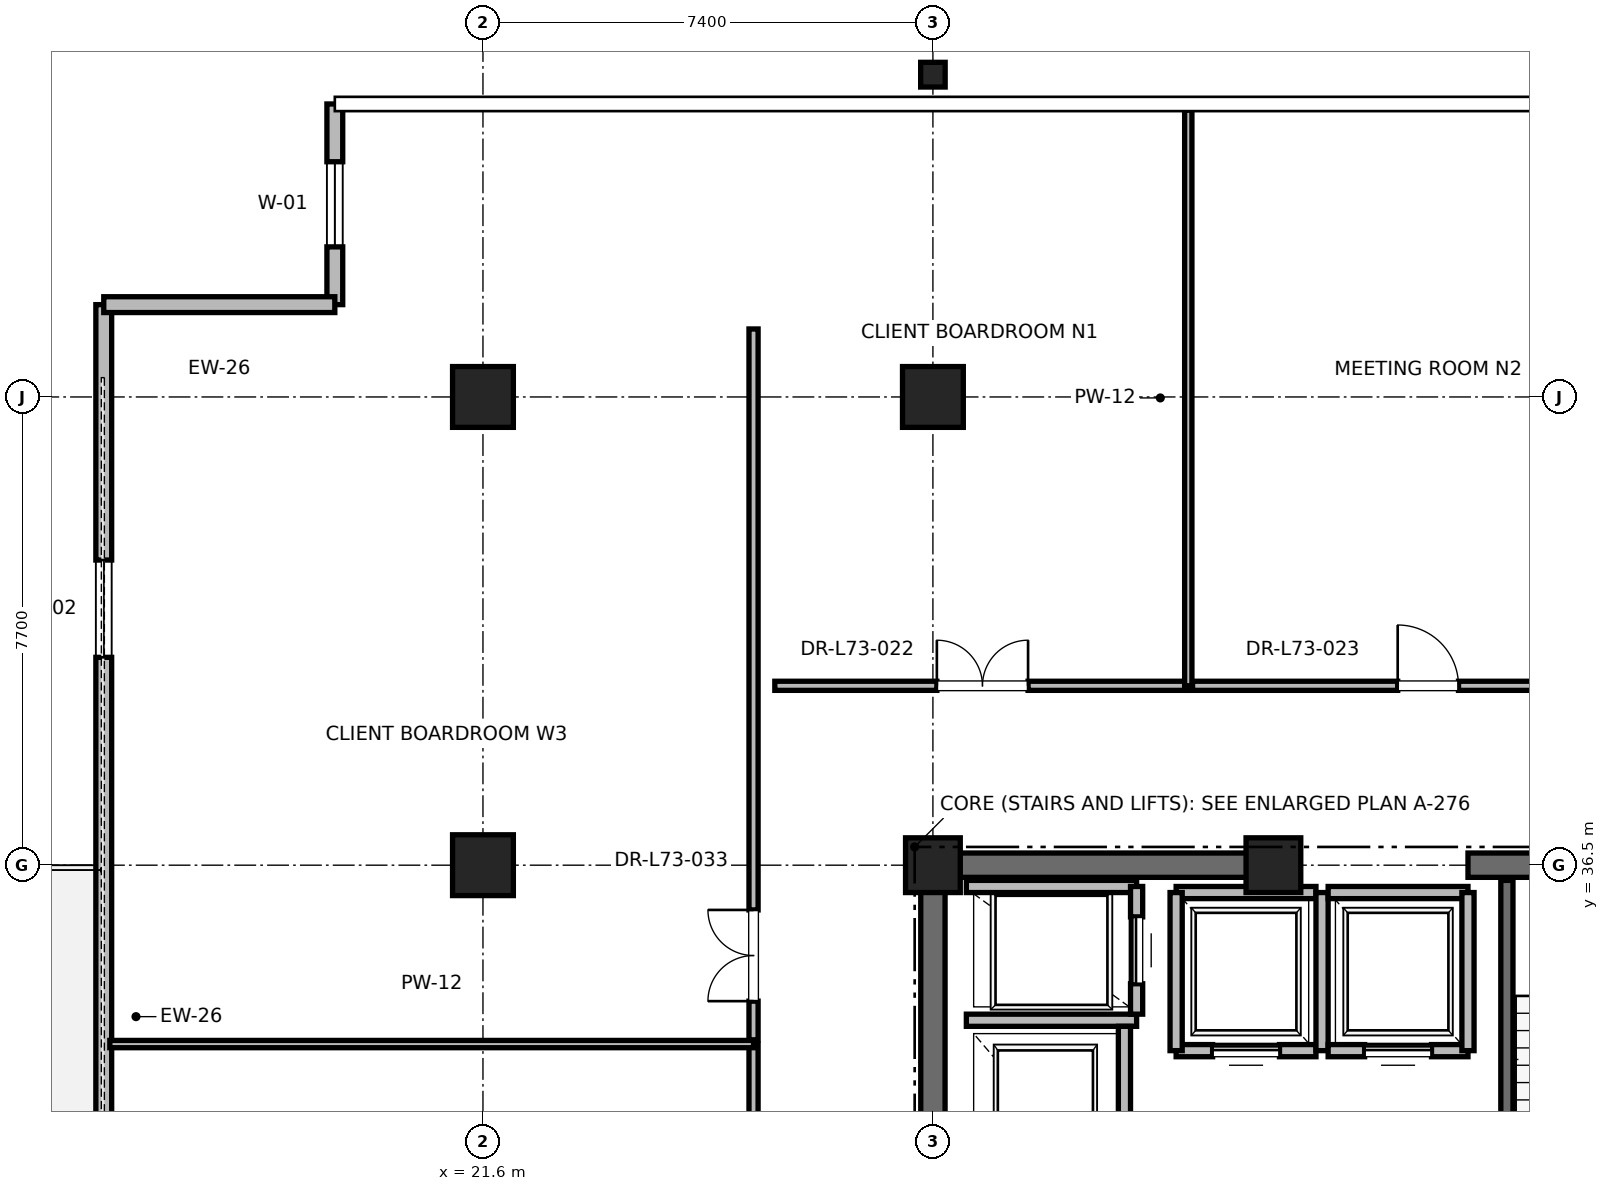
"""IFC4 building model, lengths in metres.
Left out: names, types, materials, properties, quantities, classifications, styles, units other than length and angle.
Written with IfcOpenShell. Run it as: python <this file> out.ifc"""

import sys

from ifc_helpers import new_model, si_unit, direction, frame, frame_2d, origin, origin_2d, place, context, subcontext, project, spatial, rectangle, i_section, extrude, element, fill, save


model = new_model("IFC4")
c1 = context("Model", 3, precision=1e-05, world=origin(), true_north=direction((0.0, 1.0)))
c2 = subcontext(c1, "Body", "Model", "MODEL_VIEW")
j1 = project(units=[si_unit("LENGTHUNIT", "METRE"), si_unit("PLANEANGLEUNIT", "RADIAN")], contexts=[c1])
p1 = place(None, origin())
s1 = spatial("IfcSite", under=j1, at=p1, CompositionType="ELEMENT")
p2 = place(p1, origin())
s2 = spatial("IfcBuilding", under=s1, at=p2, CompositionType="ELEMENT")
p3 = place(p2, frame((0.0, 0.0, 314.8)))
s3 = spatial("IfcBuildingStorey", under=s2, at=p3, CompositionType="ELEMENT", Elevation=314.8)
for number, where, z_axis, x_axis in (
    (1, (29.0, 44.2, 0.0), (0.0, 0.0, 1.0), (1.0, 0.0, 0.0)),
    (2, (21.6, 36.5, 0.0), (0.0, 0.0, 1.0), (1.0, 0.0, 0.0)),
    (3, (21.6, 44.2, 0.0), (0.0, 0.0, 1.0), (1.0, 0.0, 0.0)),
):
    element("IfcColumn", number, at=place(p3, frame(where, z_axis=z_axis, x_axis=x_axis)), inside=s3, PredefinedType="COLUMN", context=c2, shape_type="SweptSolid", body=[
        extrude(rectangle(XDim=1.0, YDim=1.0, at=origin_2d()), origin(), (0.0, 0.0, 1.0), 4.0),
    ])
p4 = place(p3, frame((29.0, 49.5, 0.0), z_axis=(0.0, 0.0, 1.0), x_axis=(1.0, 0.0, 0.0)))
e4 = element("IfcColumn", 4, at=p4, inside=s3, PredefinedType="COLUMN", context=c2, shape_type="SweptSolid", body=[
    extrude(i_section(OverallWidth=0.403, OverallDepth=0.406, WebThickness=0.027, FlangeThickness=0.043, FilletRadius=0.015, at=origin_2d()), origin(), (0.0, 0.0, 1.0), 4.0),
])
for number, where, z_axis, x_axis in (
    (5, (29.0, 36.5, 0.0), (0.0, 0.0, 1.0), (1.0, 0.0, 0.0)),
    (6, (34.6, 36.5, 0.0), (0.0, 0.0, 1.0), (1.0, 0.0, 0.0)),
):
    element("IfcColumn", number, at=place(p3, frame(where, z_axis=z_axis, x_axis=x_axis)), inside=s3, PredefinedType="PILASTER", context=c2, shape_type="SweptSolid", body=[
        extrude(rectangle(XDim=0.9, YDim=0.9, at=origin_2d()), origin(), (0.0, 0.0, 1.0), 4.0),
    ])
p5 = place(p3, frame((29.0, 36.5, 0.0), z_axis=(0.0, 0.0, 1.0), x_axis=(1.0, 0.0, 0.0)))
e7 = element("IfcWall", 7, at=p5, inside=s3, PredefinedType="SHEAR", context=c2, shape_type="SweptSolid", body=[
    extrude(rectangle(XDim=5.8, YDim=0.4, at=frame_2d((2.9, 0.0))), origin(), (0.0, 0.0, 1.0), 3.785),
])
p6 = place(p3, frame((37.8, 36.5, 0.0), z_axis=(0.0, 0.0, 1.0), x_axis=(1.0, 0.0, 0.0)))
e8 = element("IfcWall", 8, at=p6, inside=s3, PredefinedType="SHEAR", context=c2, shape_type="SweptSolid", body=[
    extrude(rectangle(XDim=4.4, YDim=0.4, at=frame_2d((2.2, 0.0))), origin(), (0.0, 0.0, 1.0), 3.785),
])
p7 = place(p6, frame((1.65, 0.0, 0.0)))
e9 = element("IfcOpeningElement", 9, at=p7, cuts=e8, PredefinedType="OPENING", context=c2, shape_type="SweptSolid", body=[
    extrude(rectangle(XDim=1.1, YDim=2.15, at=frame_2d((0.55, 1.075))), frame((0.0, 0.2, 0.0), z_axis=(0.0, -1.0, 0.0), x_axis=(1.0, 0.0, 0.0)), (0.0, 0.0, 1.0), 0.4),
])
p8 = place(p3, frame((29.0, 30.7, 0.0), z_axis=(0.0, 0.0, 1.0), x_axis=(0.0, 1.0, 0.0)))
e10 = element("IfcWall", 10, at=p8, inside=s3, PredefinedType="SHEAR", context=c2, shape_type="SweptSolid", body=[
    extrude(rectangle(XDim=5.8, YDim=0.4, at=frame_2d((2.9, 0.0))), origin(), (0.0, 0.0, 1.0), 3.785),
])
p9 = place(p3, frame((15.364, 45.718, 0.0), z_axis=(0.0, 0.0, 1.0), x_axis=(0.0, -1.0, 0.0)))
e11 = element("IfcWall", 11, at=p9, inside=s3, PredefinedType="PARAPET", context=c2, shape_type="SweptSolid", body=[
    extrude(rectangle(XDim=36.437, YDim=0.26, at=frame_2d((18.218, 0.0))), origin(), (0.0, 0.0, 1.0), 3.196),
])
p10 = place(p9, frame((4.2, 0.0, 0.85)))
e12 = element("IfcOpeningElement", 12, at=p10, cuts=e11, PredefinedType="OPENING", context=c2, shape_type="SweptSolid", body=[
    extrude(rectangle(XDim=1.6, YDim=2.1, at=frame_2d((0.8, 1.05))), frame((0.0, 0.13, 0.0), z_axis=(0.0, -1.0, 0.0), x_axis=(1.0, 0.0, 0.0)), (0.0, 0.0, 1.0), 0.26),
])
p11 = place(p9, frame((17.618, 0.0, 0.0)))
e13 = element("IfcOpeningElement", 13, at=p11, cuts=e11, PredefinedType="OPENING", context=c2, shape_type="SweptSolid", body=[
    extrude(rectangle(XDim=1.2, YDim=2.2, at=frame_2d((0.6, 1.1))), frame((0.0, 0.13, 0.0), z_axis=(0.0, -1.0, 0.0), x_axis=(1.0, 0.0, 0.0)), (0.0, 0.0, 1.0), 0.26),
])
p12 = place(p9, frame((30.636, 0.0, 0.85)))
e14 = element("IfcOpeningElement", 14, at=p12, cuts=e11, PredefinedType="OPENING", context=c2, shape_type="SweptSolid", body=[
    extrude(rectangle(XDim=1.6, YDim=2.1, at=frame_2d((0.8, 1.05))), frame((0.0, 0.13, 0.0), z_axis=(0.0, -1.0, 0.0), x_axis=(1.0, 0.0, 0.0)), (0.0, 0.0, 1.0), 0.26),
])
p13 = place(p3, frame((19.164, 49.018, 0.0), z_axis=(0.0, 0.0, 1.0), x_axis=(0.0, -1.0, 0.0)))
e15 = element("IfcWall", 15, at=p13, inside=s3, PredefinedType="PARAPET", context=c2, shape_type="SweptSolid", body=[
    extrude(rectangle(XDim=3.3, YDim=0.26, at=frame_2d((1.65, 0.0))), origin(), (0.0, 0.0, 1.0), 3.785),
])
p14 = place(p13, frame((0.95, 0.0, 0.85)))
e16 = element("IfcOpeningElement", 16, at=p14, cuts=e15, PredefinedType="OPENING", context=c2, shape_type="SweptSolid", body=[
    extrude(rectangle(XDim=1.4, YDim=2.0, at=frame_2d((0.7, 1.0))), frame((0.0, 0.13, 0.0), z_axis=(0.0, -1.0, 0.0), x_axis=(1.0, 0.0, 0.0)), (0.0, 0.0, 1.0), 0.26),
])
p15 = place(p3, frame((19.164, 45.718, 0.0), z_axis=(0.0, 0.0, 1.0), x_axis=(-1.0, 0.0, 0.0)))
e17 = element("IfcWall", 17, at=p15, inside=s3, PredefinedType="PARAPET", context=c2, shape_type="SweptSolid", body=[
    extrude(rectangle(XDim=3.8, YDim=0.26, at=frame_2d((1.9, 0.0))), origin(), (0.0, 0.0, 1.0), 3.785),
])
p16 = place(p3, frame((38.44, 27.38, 0.0), z_axis=(0.0, 0.0, 1.0), x_axis=(0.0, 1.0, 0.0)))
e18 = element("IfcWall", 18, at=p16, inside=s3, PredefinedType="SOLIDWALL", context=c2, shape_type="SweptSolid", body=[
    extrude(rectangle(XDim=8.87, YDim=0.2, at=frame_2d((4.435, 0.0))), origin(), (0.0, 0.0, 1.0), 3.785),
])
p17 = place(p3, frame((29.55, 33.95, 0.0), z_axis=(0.0, 0.0, 1.0), x_axis=(1.0, 0.0, 0.0)))
e19 = element("IfcWall", 19, at=p17, inside=s3, PredefinedType="SOLIDWALL", context=c2, shape_type="SweptSolid", body=[
    extrude(rectangle(XDim=2.8, YDim=0.2, at=frame_2d((1.4, 0.0))), origin(), (0.0, 0.0, 1.0), 3.785),
])
p18 = place(p3, frame((32.15, 30.85, 0.0), z_axis=(0.0, 0.0, 1.0), x_axis=(0.0, 1.0, 0.0)))
e20 = element("IfcWall", 20, at=p18, inside=s3, PredefinedType="SOLIDWALL", context=c2, shape_type="SweptSolid", body=[
    extrude(rectangle(XDim=3.0, YDim=0.2, at=frame_2d((1.5, 0.0))), origin(), (0.0, 0.0, 1.0), 3.785),
])
p19 = place(p3, frame((32.35, 36.15, 0.0), z_axis=(0.0, 0.0, 1.0), x_axis=(-1.0, 0.0, 0.0)))
e21 = element("IfcWall", 21, at=p19, inside=s3, PredefinedType="SOLIDWALL", context=c2, shape_type="SweptSolid", body=[
    extrude(rectangle(XDim=2.8, YDim=0.2, at=frame_2d((1.4, 0.0))), origin(), (0.0, 0.0, 1.0), 3.22),
])
p20 = place(p3, frame((32.35, 34.05, 0.0), z_axis=(0.0, 0.0, 1.0), x_axis=(0.0, 1.0, 0.0)))
e22 = element("IfcWall", 22, at=p20, inside=s3, PredefinedType="SOLIDWALL", context=c2, shape_type="SweptSolid", body=[
    extrude(rectangle(XDim=2.1, YDim=0.2, at=frame_2d((1.05, 0.0))), origin(), (0.0, 0.0, 1.0), 3.785),
])
p21 = place(p20, frame((0.5, 0.0, 0.0)))
e23 = element("IfcOpeningElement", 23, at=p21, cuts=e22, PredefinedType="OPENING", context=c2, shape_type="SweptSolid", body=[
    extrude(rectangle(XDim=1.1, YDim=2.2, at=frame_2d((0.55, 1.1))), frame((0.0, 0.1, 0.0), z_axis=(0.0, -1.0, 0.0), x_axis=(1.0, 0.0, 0.0)), (0.0, 0.0, 1.0), 0.2),
])
p22 = place(p3, frame((33.0, 33.45, 0.0), z_axis=(0.0, 0.0, 1.0), x_axis=(1.0, 0.0, 0.0)))
e24 = element("IfcWall", 24, at=p22, inside=s3, PredefinedType="SOLIDWALL", context=c2, shape_type="SweptSolid", body=[
    extrude(rectangle(XDim=2.3, YDim=0.2, at=frame_2d((1.15, 0.0))), origin(), (0.0, 0.0, 1.0), 3.785),
])
p23 = place(p22, frame((0.6, 0.0, 0.0)))
e25 = element("IfcOpeningElement", 25, at=p23, cuts=e24, PredefinedType="OPENING", context=c2, shape_type="SweptSolid", body=[
    extrude(rectangle(XDim=1.1, YDim=2.2, at=frame_2d((0.55, 1.1))), frame((0.0, 0.1, 0.0), z_axis=(0.0, -1.0, 0.0), x_axis=(1.0, 0.0, 0.0)), (0.0, 0.0, 1.0), 0.2),
])
p24 = place(p3, frame((35.3, 36.05, 0.0), z_axis=(0.0, 0.0, 1.0), x_axis=(-1.0, 0.0, 0.0)))
e26 = element("IfcWall", 26, at=p24, inside=s3, PredefinedType="SOLIDWALL", context=c2, shape_type="SweptSolid", body=[
    extrude(rectangle(XDim=2.3, YDim=0.2, at=frame_2d((1.15, 0.0))), origin(), (0.0, 0.0, 1.0), 2.865),
])
p25 = place(p3, frame((33.0, 36.05, 0.0), z_axis=(0.0, 0.0, 1.0), x_axis=(0.0, -1.0, 0.0)))
e27 = element("IfcWall", 27, at=p25, inside=s3, PredefinedType="SOLIDWALL", context=c2, shape_type="SweptSolid", body=[
    extrude(rectangle(XDim=2.6, YDim=0.2, at=frame_2d((1.3, 0.0))), origin(), (0.0, 0.0, 1.0), 3.785),
])
p26 = place(p3, frame((35.4, 33.45, 0.0), z_axis=(0.0, 0.0, 1.0), x_axis=(0.0, 1.0, 0.0)))
e28 = element("IfcWall", 28, at=p26, inside=s3, PredefinedType="SOLIDWALL", context=c2, shape_type="SweptSolid", body=[
    extrude(rectangle(XDim=2.6, YDim=0.2, at=frame_2d((1.3, 0.0))), origin(), (0.0, 0.0, 1.0), 2.865),
])
p27 = place(p3, frame((35.5, 33.45, 0.0), z_axis=(0.0, 0.0, 1.0), x_axis=(1.0, 0.0, 0.0)))
e29 = element("IfcWall", 29, at=p27, inside=s3, PredefinedType="SOLIDWALL", context=c2, shape_type="SweptSolid", body=[
    extrude(rectangle(XDim=2.3, YDim=0.2, at=frame_2d((1.15, 0.0))), origin(), (0.0, 0.0, 1.0), 3.785),
])
p28 = place(p27, frame((0.6, 0.0, 0.0)))
e30 = element("IfcOpeningElement", 30, at=p28, cuts=e29, PredefinedType="OPENING", context=c2, shape_type="SweptSolid", body=[
    extrude(rectangle(XDim=1.1, YDim=2.2, at=frame_2d((0.55, 1.1))), frame((0.0, 0.1, 0.0), z_axis=(0.0, -1.0, 0.0), x_axis=(1.0, 0.0, 0.0)), (0.0, 0.0, 1.0), 0.2),
])
p29 = place(p3, frame((37.8, 36.05, 0.0), z_axis=(0.0, 0.0, 1.0), x_axis=(-1.0, 0.0, 0.0)))
e31 = element("IfcWall", 31, at=p29, inside=s3, PredefinedType="SOLIDWALL", context=c2, shape_type="SweptSolid", body=[
    extrude(rectangle(XDim=2.3, YDim=0.2, at=frame_2d((1.15, 0.0))), origin(), (0.0, 0.0, 1.0), 2.865),
])
p30 = place(p3, frame((37.8, 33.45, 0.0), z_axis=(0.0, 0.0, 1.0), x_axis=(0.0, 1.0, 0.0)))
e32 = element("IfcWall", 32, at=p30, inside=s3, PredefinedType="SOLIDWALL", context=c2, shape_type="SweptSolid", body=[
    extrude(rectangle(XDim=2.6, YDim=0.2, at=frame_2d((1.3, 0.0))), origin(), (0.0, 0.0, 1.0), 2.865),
])
p31 = place(p3, frame((26.4, 39.45, 0.0), z_axis=(0.0, 0.0, 1.0), x_axis=(1.0, 0.0, 0.0)))
e33 = element("IfcWall", 33, at=p31, inside=s3, PredefinedType="PARTITIONING", context=c2, shape_type="SweptSolid", body=[
    extrude(rectangle(XDim=6.8, YDim=0.15, at=frame_2d((3.4, 0.0))), origin(), (0.0, 0.0, 1.0), 2.85),
])
p32 = place(p31, frame((2.665, 0.0, 0.0)))
e34 = element("IfcOpeningElement", 34, at=p32, cuts=e33, PredefinedType="OPENING", context=c2, shape_type="SweptSolid", body=[
    extrude(rectangle(XDim=1.5, YDim=2.25, at=frame_2d((0.75, 1.125))), frame((0.0, 0.075, 0.0), z_axis=(0.0, -1.0, 0.0), x_axis=(1.0, 0.0, 0.0)), (0.0, 0.0, 1.0), 0.15),
])
p33 = place(p3, frame((33.2, 39.45, 0.0), z_axis=(0.0, 0.0, 1.0), x_axis=(0.0, 1.0, 0.0)))
e35 = element("IfcWall", 35, at=p33, inside=s3, PredefinedType="PARTITIONING", context=c2, shape_type="SweptSolid", body=[
    extrude(rectangle(XDim=9.468, YDim=0.12, at=frame_2d((4.734, 0.0))), origin(), (0.0, 0.0, 1.0), 2.415),
])
p34 = place(p3, frame((33.27, 39.45, 0.0), z_axis=(0.0, 0.0, 1.0), x_axis=(1.0, 0.0, 0.0)))
e36 = element("IfcWall", 36, at=p34, inside=s3, PredefinedType="PARTITIONING", context=c2, shape_type="SweptSolid", body=[
    extrude(rectangle(XDim=7.818, YDim=0.15, at=frame_2d((3.909, 0.0))), origin(), (0.0, 0.0, 1.0), 2.85),
])
p35 = place(p34, frame((3.374, 0.0, 0.0)))
e37 = element("IfcOpeningElement", 37, at=p35, cuts=e36, PredefinedType="OPENING", context=c2, shape_type="SweptSolid", body=[
    extrude(rectangle(XDim=1.0, YDim=2.15, at=frame_2d((0.5, 1.075))), frame((0.0, 0.075, 0.0), z_axis=(0.0, -1.0, 0.0), x_axis=(1.0, 0.0, 0.0)), (0.0, 0.0, 1.0), 0.15),
])
p36 = place(p3, frame((26.05, 20.799, 0.0), z_axis=(0.0, 0.0, 1.0), x_axis=(0.0, 1.0, 0.0)))
e38 = element("IfcWall", 38, at=p36, inside=s3, PredefinedType="PARTITIONING", context=c2, shape_type="SweptSolid", body=[
    extrude(rectangle(XDim=12.759, YDim=0.15, at=frame_2d((6.379, 0.0))), origin(), (0.0, 0.0, 1.0), 2.85),
])
p37 = place(p36, frame((5.82, 0.0, 0.0)))
e39 = element("IfcOpeningElement", 39, at=p37, cuts=e38, PredefinedType="OPENING", context=c2, shape_type="SweptSolid", body=[
    extrude(rectangle(XDim=1.05, YDim=2.2, at=frame_2d((0.525, 1.1))), frame((0.0, 0.075, 0.0), z_axis=(0.0, -1.0, 0.0), x_axis=(1.0, 0.0, 0.0)), (0.0, 0.0, 1.0), 0.15),
])
p38 = place(p3, frame((15.464, 33.558, 0.0), z_axis=(0.0, 0.0, 1.0), x_axis=(1.0, 0.0, 0.0)))
e40 = element("IfcWall", 40, at=p38, inside=s3, PredefinedType="PARTITIONING", context=c2, shape_type="SweptSolid", body=[
    extrude(rectangle(XDim=10.586, YDim=0.12, at=frame_2d((5.293, 0.0))), origin(), (0.0, 0.0, 1.0), 2.85),
])
p39 = place(p3, frame((26.05, 33.628, 0.0), z_axis=(0.0, 0.0, 1.0), x_axis=(0.0, 1.0, 0.0)))
e41 = element("IfcWall", 41, at=p39, inside=s3, PredefinedType="PARTITIONING", context=c2, shape_type="SweptSolid", body=[
    extrude(rectangle(XDim=11.69, YDim=0.15, at=frame_2d((5.845, 0.0))), origin(), (0.0, 0.0, 1.0), 2.85),
])
p40 = place(p39, frame((0.636, 0.0, 0.0)))
e42 = element("IfcOpeningElement", 42, at=p40, cuts=e41, PredefinedType="OPENING", context=c2, shape_type="SweptSolid", body=[
    extrude(rectangle(XDim=1.5, YDim=2.25, at=frame_2d((0.75, 1.125))), frame((0.0, 0.075, 0.0), z_axis=(0.0, -1.0, 0.0), x_axis=(1.0, 0.0, 0.0)), (0.0, 0.0, 1.0), 0.15),
])
p41 = place(p10, origin())
e43 = element("IfcWindow", 43, at=p41, inside=s3, PartitioningType="SINGLE_PANEL", PredefinedType="WINDOW", context=c2, shape_type="SweptSolid", body=[
    extrude(rectangle(XDim=1.6, YDim=2.1, at=frame_2d((0.8, 1.05))), frame((0.0, 0.03, 0.0), z_axis=(0.0, -1.0, 0.0), x_axis=(1.0, 0.0, 0.0)), (0.0, 0.0, 1.0), 0.06),
])
fill(e12, e43)
p42 = place(p14, origin())
e44 = element("IfcWindow", 44, at=p42, inside=s3, PartitioningType="SINGLE_PANEL", PredefinedType="WINDOW", context=c2, shape_type="SweptSolid", body=[
    extrude(rectangle(XDim=1.4, YDim=2.0, at=frame_2d((0.7, 1.0))), frame((0.0, 0.03, 0.0), z_axis=(0.0, -1.0, 0.0), x_axis=(1.0, 0.0, 0.0)), (0.0, 0.0, 1.0), 0.06),
])
fill(e16, e44)
p43 = place(p21, origin())
e45 = element("IfcDoor", 45, at=p43, inside=s3, OperationType="SLIDING_TO_RIGHT", PredefinedType="DOOR", context=c2, shape_type="SweptSolid", body=[
    extrude(rectangle(XDim=1.1, YDim=2.2, at=frame_2d((0.55, 1.1))), frame((0.0, 0.025, 0.0), z_axis=(0.0, -1.0, 0.0), x_axis=(1.0, 0.0, 0.0)), (0.0, 0.0, 1.0), 0.05),
])
fill(e23, e45)
p44 = place(p23, origin())
e46 = element("IfcDoor", 46, at=p44, inside=s3, OperationType="SLIDING_TO_RIGHT", PredefinedType="DOOR", context=c2, shape_type="SweptSolid", body=[
    extrude(rectangle(XDim=1.1, YDim=2.2, at=frame_2d((0.55, 1.1))), frame((0.0, 0.025, 0.0), z_axis=(0.0, -1.0, 0.0), x_axis=(1.0, 0.0, 0.0)), (0.0, 0.0, 1.0), 0.05),
])
fill(e25, e46)
p45 = place(p28, origin())
e47 = element("IfcDoor", 47, at=p45, inside=s3, OperationType="SLIDING_TO_RIGHT", PredefinedType="DOOR", context=c2, shape_type="SweptSolid", body=[
    extrude(rectangle(XDim=1.1, YDim=2.2, at=frame_2d((0.55, 1.1))), frame((0.0, 0.025, 0.0), z_axis=(0.0, -1.0, 0.0), x_axis=(1.0, 0.0, 0.0)), (0.0, 0.0, 1.0), 0.05),
])
fill(e30, e47)
p46 = place(p32, origin())
e48 = element("IfcDoor", 48, at=p46, inside=s3, OperationType="DOUBLE_DOOR_SINGLE_SWING", PredefinedType="DOOR", context=c2, shape_type="SweptSolid", body=[
    extrude(rectangle(XDim=1.5, YDim=2.25, at=frame_2d((0.75, 1.125))), frame((0.0, 0.025, 0.0), z_axis=(0.0, -1.0, 0.0), x_axis=(1.0, 0.0, 0.0)), (0.0, 0.0, 1.0), 0.05),
])
fill(e34, e48)
p47 = place(p35, origin())
e49 = element("IfcDoor", 49, at=p47, inside=s3, OperationType="SINGLE_SWING_LEFT", PredefinedType="DOOR", context=c2, shape_type="SweptSolid", body=[
    extrude(rectangle(XDim=1.0, YDim=2.15, at=frame_2d((0.5, 1.075))), frame((0.0, 0.025, 0.0), z_axis=(0.0, -1.0, 0.0), x_axis=(1.0, 0.0, 0.0)), (0.0, 0.0, 1.0), 0.05),
])
fill(e37, e49)
p48 = place(p40, origin())
e50 = element("IfcDoor", 50, at=p48, inside=s3, OperationType="DOUBLE_DOOR_SINGLE_SWING", PredefinedType="DOOR", context=c2, shape_type="SweptSolid", body=[
    extrude(rectangle(XDim=1.5, YDim=2.25, at=frame_2d((0.75, 1.125))), frame((0.0, 0.025, 0.0), z_axis=(0.0, -1.0, 0.0), x_axis=(1.0, 0.0, 0.0)), (0.0, 0.0, 1.0), 0.05),
])
fill(e42, e50)
save(model, sys.argv[1])
